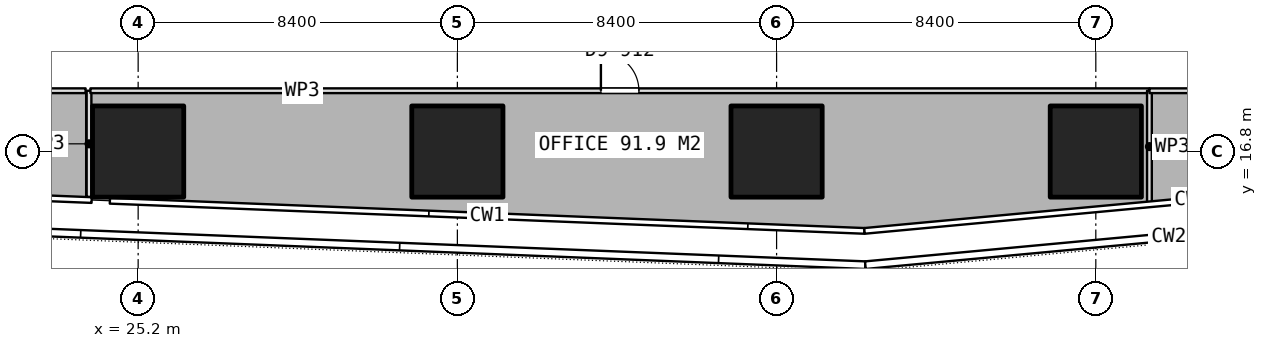
"""IFC4 building model, lengths in metres.
Left out: names, types, materials, properties, quantities, classifications, styles, units other than length and angle.
Written with IfcOpenShell. Run it as: python <this file> out.ifc"""

import sys

from ifc_helpers import new_model, si_unit, direction, frame, frame_2d, origin, origin_2d, place, context, subcontext, project, spatial, rectangle, extrude, element, fill, save


model = new_model("IFC4")
c1 = context("Model", 3, precision=1e-05, world=origin(), true_north=direction((0.0, 1.0)))
c2 = subcontext(c1, "Body", "Model", "MODEL_VIEW")
j1 = project(units=[si_unit("LENGTHUNIT", "METRE"), si_unit("PLANEANGLEUNIT", "RADIAN")], contexts=[c1])
p1 = place(None, origin())
s1 = spatial("IfcSite", under=j1, at=p1, CompositionType="ELEMENT")
p2 = place(p1, origin())
s2 = spatial("IfcBuilding", under=s1, at=p2, CompositionType="ELEMENT")
p3 = place(p2, frame((0.0, 0.0, 232.7)))
s3 = spatial("IfcBuildingStorey", under=s2, at=p3, CompositionType="ELEMENT", Elevation=232.7)
for number, where, z_axis, x_axis in (
    (1, (25.2, 16.8, 0.0), (0.0, 0.0, 1.0), (1.0, 0.0, 0.0)),
    (2, (33.6, 16.8, 0.0), (0.0, 0.0, 1.0), (1.0, 0.0, 0.0)),
    (3, (42.0, 16.8, 0.0), (0.0, 0.0, 1.0), (1.0, 0.0, 0.0)),
    (4, (50.4, 16.8, 0.0), (0.0, 0.0, 1.0), (1.0, 0.0, 0.0)),
):
    element("IfcColumn", number, at=place(p3, frame(where, z_axis=z_axis, x_axis=x_axis)), inside=s3, PredefinedType="COLUMN", context=c2, shape_type="SweptSolid", body=[
        extrude(rectangle(XDim=2.4, YDim=2.4, at=origin_2d()), origin(), (0.0, 0.0, 1.0), 3.75),
    ])
p4 = place(p3, frame((23.907, 15.606, 0.0), z_axis=(0.0, 0.0, 1.0), x_axis=(0.0, 1.0, 0.0)))
e5 = element("IfcWall", 5, at=p4, inside=s3, PredefinedType="PARTITIONING", context=c2, shape_type="SweptSolid", body=[
    extrude(rectangle(XDim=2.794, YDim=0.125, at=frame_2d((1.397, 0.0))), origin(), (0.0, 0.0, 1.0), 3.5),
])
p5 = place(p3, frame((23.944, 18.4, 0.0), z_axis=(0.0, 0.0, 1.0), x_axis=(1.0, 0.0, 0.0)))
e6 = element("IfcWall", 6, at=p5, inside=s3, PredefinedType="PARTITIONING", context=c2, shape_type="SweptSolid", body=[
    extrude(rectangle(XDim=27.867, YDim=0.125, at=frame_2d((13.934, 0.0))), origin(), (0.0, 0.0, 1.0), 3.5),
])
p6 = place(p5, frame((13.433, 0.0, 0.0)))
e7 = element("IfcOpeningElement", 7, at=p6, cuts=e6, PredefinedType="OPENING", context=c2, shape_type="SweptSolid", body=[
    extrude(rectangle(XDim=1.0, YDim=2.1, at=frame_2d((0.5, 1.05))), frame((0.0, 0.073, 0.0), z_axis=(0.0, -1.0, 0.0), x_axis=(1.0, 0.0, 0.0)), (0.0, 0.0, 1.0), 0.145),
])
p7 = place(p3, frame((51.811, 18.4, 0.0), z_axis=(0.0, 0.0, 1.0), x_axis=(0.0, -1.0, 0.0)))
e8 = element("IfcWall", 8, at=p7, inside=s3, PredefinedType="PARTITIONING", context=c2, shape_type="SweptSolid", body=[
    extrude(rectangle(XDim=2.94, YDim=0.125, at=frame_2d((1.47, 0.0))), origin(), (0.0, 0.0, 1.0), 3.5),
])
p8 = place(p3, frame((51.812, 18.4, 0.0), z_axis=(0.0, 0.0, 1.0), x_axis=(1.0, 0.0, 0.0)))
e9 = element("IfcWall", 9, at=p8, inside=s3, PredefinedType="PARTITIONING", context=c2, shape_type="SweptSolid", body=[
    extrude(rectangle(XDim=4.588, YDim=0.125, at=frame_2d((2.294, 0.0))), origin(), (0.0, 0.0, 1.0), 3.5),
])
p9 = place(p8, frame((1.794, 0.0, 0.0)))
e10 = element("IfcOpeningElement", 10, at=p9, cuts=e9, PredefinedType="OPENING", context=c2, shape_type="SweptSolid", body=[
    extrude(rectangle(XDim=1.0, YDim=2.1, at=frame_2d((0.5, 1.05))), frame((0.0, 0.073, 0.0), z_axis=(0.0, -1.0, 0.0), x_axis=(1.0, 0.0, 0.0)), (0.0, 0.0, 1.0), 0.145),
])
p10 = place(p3, frame((19.2, 18.4, 0.0), z_axis=(0.0, 0.0, 1.0), x_axis=(1.0, 0.0, 0.0)))
e11 = element("IfcWall", 11, at=p10, inside=s3, PredefinedType="PARTITIONING", context=c2, shape_type="SweptSolid", body=[
    extrude(rectangle(XDim=4.617, YDim=0.125, at=frame_2d((2.309, 0.0))), origin(), (0.0, 0.0, 1.0), 3.5),
])
p11 = place(p10, frame((1.808, 0.0, 0.0)))
e12 = element("IfcOpeningElement", 12, at=p11, cuts=e11, PredefinedType="OPENING", context=c2, shape_type="SweptSolid", body=[
    extrude(rectangle(XDim=1.0, YDim=2.1, at=frame_2d((0.5, 1.05))), frame((0.0, 0.073, 0.0), z_axis=(0.0, -1.0, 0.0), x_axis=(1.0, 0.0, 0.0)), (0.0, 0.0, 1.0), 0.145),
])
p12 = place(p6, origin())
e13 = element("IfcDoor", 13, at=p12, inside=s3, OperationType="SINGLE_SWING_LEFT", PredefinedType="DOOR", context=c2, shape_type="SweptSolid", body=[
    extrude(rectangle(XDim=1.0, YDim=2.1, at=frame_2d((0.5, 1.05))), frame((0.0, 0.025, 0.0), z_axis=(0.0, -1.0, 0.0), x_axis=(1.0, 0.0, 0.0)), (0.0, 0.0, 1.0), 0.05),
])
fill(e7, e13)
save(model, sys.argv[1])
